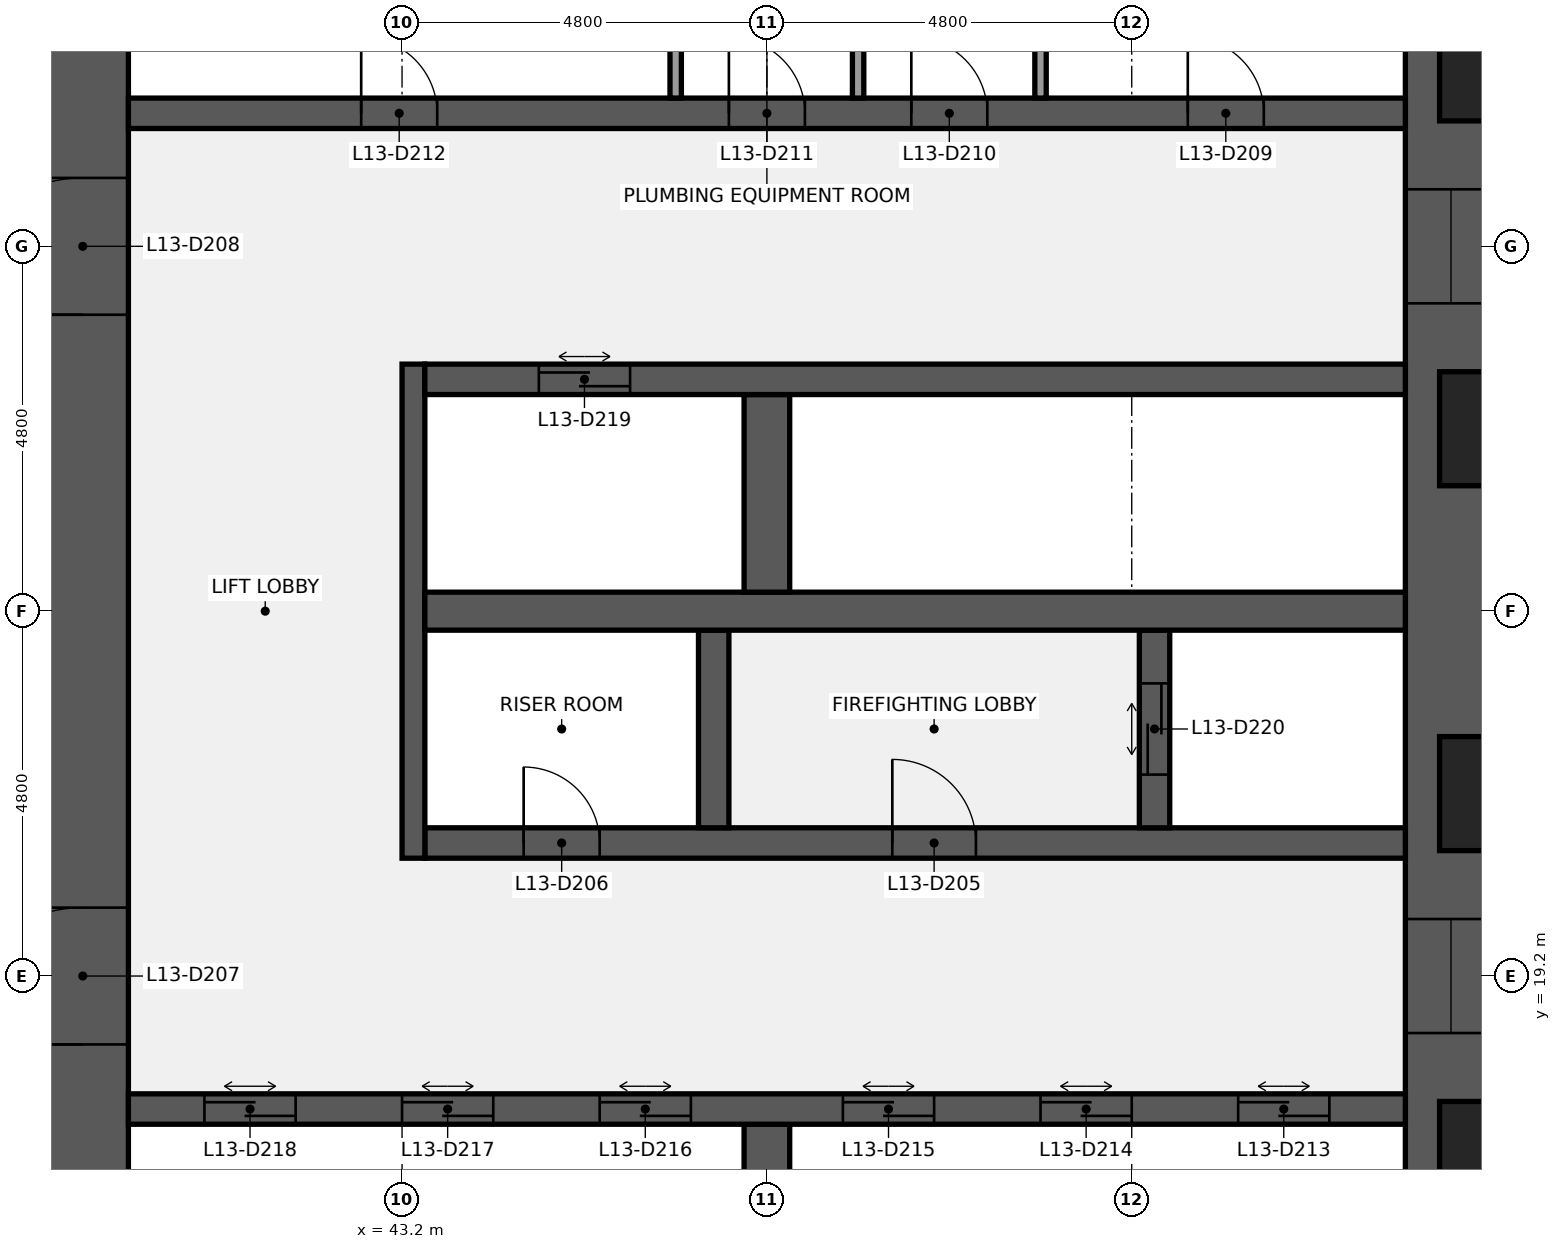
"""IFC4 building model, lengths in metres.
Left out: names, types, materials, properties, quantities, classifications, styles, units other than length and angle.
Written with IfcOpenShell. Run it as: python <this file> out.ifc"""

import sys

from ifc_helpers import new_model, si_unit, direction, frame, frame_2d, origin, place, context, subcontext, project, spatial, rectangle, extrude, element, fill, save


model = new_model("IFC4")
c1 = context("Model", 3, precision=1e-05, world=origin(), true_north=direction((0.0, 1.0)))
c2 = subcontext(c1, "Body", "Model", "MODEL_VIEW")
j1 = project(units=[si_unit("LENGTHUNIT", "METRE"), si_unit("PLANEANGLEUNIT", "RADIAN")], contexts=[c1])
p1 = place(None, origin())
s1 = spatial("IfcSite", under=j1, at=p1, CompositionType="ELEMENT")
p2 = place(p1, origin())
s2 = spatial("IfcBuilding", under=s1, at=p2, CompositionType="ELEMENT")
p3 = place(p2, frame((0.0, 0.0, 63.0)))
s3 = spatial("IfcBuildingStorey", under=s2, at=p3, CompositionType="ELEMENT", Elevation=63.0)
p4 = place(p3, frame((57.0, 38.4, 0.0), z_axis=(0.0, 0.0, 1.0), x_axis=(0.0, -1.0, 0.0)))
e1 = element("IfcWall", 1, at=p4, inside=s3, PredefinedType="SHEAR", context=c2, shape_type="SweptSolid", body=[
    extrude(rectangle(XDim=28.8, YDim=1.2, at=frame_2d((14.4, 0.0))), origin(), (0.0, 0.0, 1.0), 3.84),
])
p5 = place(p4, frame((18.45, 0.0, 0.9)))
e2 = element("IfcOpeningElement", 2, at=p5, cuts=e1, PredefinedType="OPENING", context=c2, shape_type="SweptSolid", body=[
    extrude(rectangle(XDim=1.5, YDim=1.5, at=frame_2d((0.75, 0.75))), frame((0.0, 0.61, 0.0), z_axis=(0.0, -1.0, 0.0), x_axis=(1.0, 0.0, 0.0)), (0.0, 0.0, 1.0), 1.22),
])
p6 = place(p4, frame((8.85, 0.0, 0.9)))
e3 = element("IfcOpeningElement", 3, at=p6, cuts=e1, PredefinedType="OPENING", context=c2, shape_type="SweptSolid", body=[
    extrude(rectangle(XDim=1.5, YDim=1.5, at=frame_2d((0.75, 0.75))), frame((0.0, 0.61, 0.0), z_axis=(0.0, -1.0, 0.0), x_axis=(1.0, 0.0, 0.0)), (0.0, 0.0, 1.0), 1.22),
])
p7 = place(p3, frame((39.0, 9.6, 0.0), z_axis=(0.0, 0.0, 1.0), x_axis=(0.0, 1.0, 0.0)))
e4 = element("IfcWall", 4, at=p7, inside=s3, PredefinedType="SHEAR", context=c2, shape_type="SweptSolid", body=[
    extrude(rectangle(XDim=28.8, YDim=1.2, at=frame_2d((14.4, 0.0))), origin(), (0.0, 0.0, 1.0), 3.84),
])
p8 = place(p7, frame((8.7, 0.0, 0.0)))
e5 = element("IfcOpeningElement", 5, at=p8, cuts=e4, PredefinedType="OPENING", context=c2, shape_type="SweptSolid", body=[
    extrude(rectangle(XDim=1.8, YDim=2.1, at=frame_2d((0.9, 1.05))), frame((0.0, 0.61, 0.0), z_axis=(0.0, -1.0, 0.0), x_axis=(1.0, 0.0, 0.0)), (0.0, 0.0, 1.0), 1.22),
])
p9 = place(p7, frame((18.3, 0.0, 0.0)))
e6 = element("IfcOpeningElement", 6, at=p9, cuts=e4, PredefinedType="OPENING", context=c2, shape_type="SweptSolid", body=[
    extrude(rectangle(XDim=1.8, YDim=2.1, at=frame_2d((0.9, 1.05))), frame((0.0, 0.61, 0.0), z_axis=(0.0, -1.0, 0.0), x_axis=(1.0, 0.0, 0.0)), (0.0, 0.0, 1.0), 1.22),
])
p10 = place(p3, frame((48.0, 14.65, 0.0), z_axis=(0.0, 0.0, 1.0), x_axis=(0.0, 1.0, 0.0)))
e7 = element("IfcWall", 7, at=p10, inside=s3, PredefinedType="SHEAR", context=c2, shape_type="SweptSolid", body=[
    extrude(rectangle(XDim=2.6, YDim=0.6, at=frame_2d((1.3, 0.0))), origin(), (0.0, 0.0, 1.0), 3.84),
])
p11 = place(p3, frame((39.6, 17.45, 0.0), z_axis=(0.0, 0.0, 1.0), x_axis=(1.0, 0.0, 0.0)))
e8 = element("IfcWall", 8, at=p11, inside=s3, PredefinedType="SHEAR", context=c2, shape_type="SweptSolid", body=[
    extrude(rectangle(XDim=16.8, YDim=0.4, at=frame_2d((8.4, 0.0))), origin(), (0.0, 0.0, 1.0), 3.84),
])
p12 = place(p11, frame((14.6, 0.0, 0.0)))
e9 = element("IfcOpeningElement", 9, at=p12, cuts=e8, PredefinedType="OPENING", context=c2, shape_type="SweptSolid", body=[
    extrude(rectangle(XDim=1.2, YDim=2.1, at=frame_2d((0.6, 1.05))), frame((0.0, 0.21, 0.0), z_axis=(0.0, -1.0, 0.0), x_axis=(1.0, 0.0, 0.0)), (0.0, 0.0, 1.0), 0.42),
])
p13 = place(p11, frame((12.0, 0.0, 0.0)))
e10 = element("IfcOpeningElement", 10, at=p13, cuts=e8, PredefinedType="OPENING", context=c2, shape_type="SweptSolid", body=[
    extrude(rectangle(XDim=1.2, YDim=2.1, at=frame_2d((0.6, 1.05))), frame((0.0, 0.21, 0.0), z_axis=(0.0, -1.0, 0.0), x_axis=(1.0, 0.0, 0.0)), (0.0, 0.0, 1.0), 0.42),
])
p14 = place(p11, frame((9.4, 0.0, 0.0)))
e11 = element("IfcOpeningElement", 11, at=p14, cuts=e8, PredefinedType="OPENING", context=c2, shape_type="SweptSolid", body=[
    extrude(rectangle(XDim=1.2, YDim=2.1, at=frame_2d((0.6, 1.05))), frame((0.0, 0.21, 0.0), z_axis=(0.0, -1.0, 0.0), x_axis=(1.0, 0.0, 0.0)), (0.0, 0.0, 1.0), 0.42),
])
p15 = place(p11, frame((6.2, 0.0, 0.0)))
e12 = element("IfcOpeningElement", 12, at=p15, cuts=e8, PredefinedType="OPENING", context=c2, shape_type="SweptSolid", body=[
    extrude(rectangle(XDim=1.2, YDim=2.1, at=frame_2d((0.6, 1.05))), frame((0.0, 0.21, 0.0), z_axis=(0.0, -1.0, 0.0), x_axis=(1.0, 0.0, 0.0)), (0.0, 0.0, 1.0), 0.42),
])
p16 = place(p11, frame((3.6, 0.0, 0.0)))
e13 = element("IfcOpeningElement", 13, at=p16, cuts=e8, PredefinedType="OPENING", context=c2, shape_type="SweptSolid", body=[
    extrude(rectangle(XDim=1.2, YDim=2.1, at=frame_2d((0.6, 1.05))), frame((0.0, 0.21, 0.0), z_axis=(0.0, -1.0, 0.0), x_axis=(1.0, 0.0, 0.0)), (0.0, 0.0, 1.0), 0.42),
])
p17 = place(p11, frame((1.0, 0.0, 0.0)))
e14 = element("IfcOpeningElement", 14, at=p17, cuts=e8, PredefinedType="OPENING", context=c2, shape_type="SweptSolid", body=[
    extrude(rectangle(XDim=1.2, YDim=2.1, at=frame_2d((0.6, 1.05))), frame((0.0, 0.21, 0.0), z_axis=(0.0, -1.0, 0.0), x_axis=(1.0, 0.0, 0.0)), (0.0, 0.0, 1.0), 0.42),
])
p18 = place(p3, frame((43.5, 20.95, 0.0), z_axis=(0.0, 0.0, 1.0), x_axis=(1.0, 0.0, 0.0)))
e15 = element("IfcWall", 15, at=p18, inside=s3, PredefinedType="SHEAR", context=c2, shape_type="SweptSolid", body=[
    extrude(rectangle(XDim=12.9, YDim=0.4, at=frame_2d((6.45, 0.0))), origin(), (0.0, 0.0, 1.0), 3.84),
])
p19 = place(p18, frame((6.15, 0.0, 0.0)))
e16 = element("IfcOpeningElement", 16, at=p19, cuts=e15, PredefinedType="OPENING", context=c2, shape_type="SweptSolid", body=[
    extrude(rectangle(XDim=1.1, YDim=2.1, at=frame_2d((0.55, 1.05))), frame((0.0, 0.21, 0.0), z_axis=(0.0, -1.0, 0.0), x_axis=(1.0, 0.0, 0.0)), (0.0, 0.0, 1.0), 0.42),
])
p20 = place(p18, frame((1.3, 0.0, 0.0)))
e17 = element("IfcOpeningElement", 17, at=p20, cuts=e15, PredefinedType="OPENING", context=c2, shape_type="SweptSolid", body=[
    extrude(rectangle(XDim=1.0, YDim=2.1, at=frame_2d((0.5, 1.05))), frame((0.0, 0.21, 0.0), z_axis=(0.0, -1.0, 0.0), x_axis=(1.0, 0.0, 0.0)), (0.0, 0.0, 1.0), 0.42),
])
p21 = place(p3, frame((43.35, 20.75, 0.0), z_axis=(0.0, 0.0, 1.0), x_axis=(0.0, 1.0, 0.0)))
e18 = element("IfcWall", 18, at=p21, inside=s3, PredefinedType="SHEAR", context=c2, shape_type="SweptSolid", body=[
    extrude(rectangle(XDim=6.5, YDim=0.3, at=frame_2d((3.25, 0.0))), origin(), (0.0, 0.0, 1.0), 3.84),
])
p22 = place(p3, frame((53.1, 21.15, 0.0), z_axis=(0.0, 0.0, 1.0), x_axis=(0.0, 1.0, 0.0)))
e19 = element("IfcWall", 19, at=p22, inside=s3, PredefinedType="SHEAR", context=c2, shape_type="SweptSolid", body=[
    extrude(rectangle(XDim=2.6, YDim=0.4, at=frame_2d((1.3, 0.0))), origin(), (0.0, 0.0, 1.0), 3.84),
])
p23 = place(p22, frame((0.7, 0.0, 0.0)))
e20 = element("IfcOpeningElement", 20, at=p23, cuts=e19, PredefinedType="OPENING", context=c2, shape_type="SweptSolid", body=[
    extrude(rectangle(XDim=1.2, YDim=2.1, at=frame_2d((0.6, 1.05))), frame((0.0, 0.21, 0.0), z_axis=(0.0, -1.0, 0.0), x_axis=(1.0, 0.0, 0.0)), (0.0, 0.0, 1.0), 0.42),
])
p24 = place(p3, frame((47.3, 21.15, 0.0), z_axis=(0.0, 0.0, 1.0), x_axis=(0.0, 1.0, 0.0)))
e21 = element("IfcWall", 21, at=p24, inside=s3, PredefinedType="SHEAR", context=c2, shape_type="SweptSolid", body=[
    extrude(rectangle(XDim=2.6, YDim=0.4, at=frame_2d((1.3, 0.0))), origin(), (0.0, 0.0, 1.0), 3.84),
])
p25 = place(p3, frame((43.5, 24.0, 0.0), z_axis=(0.0, 0.0, 1.0), x_axis=(1.0, 0.0, 0.0)))
e22 = element("IfcWall", 22, at=p25, inside=s3, PredefinedType="SHEAR", context=c2, shape_type="SweptSolid", body=[
    extrude(rectangle(XDim=12.9, YDim=0.5, at=frame_2d((6.45, 0.0))), origin(), (0.0, 0.0, 1.0), 3.84),
])
p26 = place(p3, frame((48.0, 24.25, 0.0), z_axis=(0.0, 0.0, 1.0), x_axis=(0.0, 1.0, 0.0)))
e23 = element("IfcWall", 23, at=p26, inside=s3, PredefinedType="SHEAR", context=c2, shape_type="SweptSolid", body=[
    extrude(rectangle(XDim=2.6, YDim=0.6, at=frame_2d((1.3, 0.0))), origin(), (0.0, 0.0, 1.0), 3.84),
])
p27 = place(p3, frame((43.5, 27.05, 0.0), z_axis=(0.0, 0.0, 1.0), x_axis=(1.0, 0.0, 0.0)))
e24 = element("IfcWall", 24, at=p27, inside=s3, PredefinedType="SHEAR", context=c2, shape_type="SweptSolid", body=[
    extrude(rectangle(XDim=12.9, YDim=0.4, at=frame_2d((6.45, 0.0))), origin(), (0.0, 0.0, 1.0), 3.84),
])
p28 = place(p27, frame((1.5, 0.0, 0.0)))
e25 = element("IfcOpeningElement", 25, at=p28, cuts=e24, PredefinedType="OPENING", context=c2, shape_type="SweptSolid", body=[
    extrude(rectangle(XDim=1.2, YDim=2.1, at=frame_2d((0.6, 1.05))), frame((0.0, 0.21, 0.0), z_axis=(0.0, -1.0, 0.0), x_axis=(1.0, 0.0, 0.0)), (0.0, 0.0, 1.0), 0.42),
])
p29 = place(p3, frame((39.6, 30.55, 0.0), z_axis=(0.0, 0.0, 1.0), x_axis=(1.0, 0.0, 0.0)))
e26 = element("IfcWall", 26, at=p29, inside=s3, PredefinedType="SHEAR", context=c2, shape_type="SweptSolid", body=[
    extrude(rectangle(XDim=16.8, YDim=0.4, at=frame_2d((8.4, 0.0))), origin(), (0.0, 0.0, 1.0), 3.84),
])
p30 = place(p29, frame((13.938, 0.0, 0.0)))
e27 = element("IfcOpeningElement", 27, at=p30, cuts=e26, PredefinedType="OPENING", context=c2, shape_type="SweptSolid", body=[
    extrude(rectangle(XDim=1.0, YDim=2.1, at=frame_2d((0.5, 1.05))), frame((0.0, 0.21, 0.0), z_axis=(0.0, -1.0, 0.0), x_axis=(1.0, 0.0, 0.0)), (0.0, 0.0, 1.0), 0.42),
])
p31 = place(p29, frame((10.3, 0.0, 0.0)))
e28 = element("IfcOpeningElement", 28, at=p31, cuts=e26, PredefinedType="OPENING", context=c2, shape_type="SweptSolid", body=[
    extrude(rectangle(XDim=1.0, YDim=2.1, at=frame_2d((0.5, 1.05))), frame((0.0, 0.21, 0.0), z_axis=(0.0, -1.0, 0.0), x_axis=(1.0, 0.0, 0.0)), (0.0, 0.0, 1.0), 0.42),
])
p32 = place(p29, frame((7.9, 0.0, 0.0)))
e29 = element("IfcOpeningElement", 29, at=p32, cuts=e26, PredefinedType="OPENING", context=c2, shape_type="SweptSolid", body=[
    extrude(rectangle(XDim=1.0, YDim=2.1, at=frame_2d((0.5, 1.05))), frame((0.0, 0.21, 0.0), z_axis=(0.0, -1.0, 0.0), x_axis=(1.0, 0.0, 0.0)), (0.0, 0.0, 1.0), 0.42),
])
p33 = place(p29, frame((3.062, 0.0, 0.0)))
e30 = element("IfcOpeningElement", 30, at=p33, cuts=e26, PredefinedType="OPENING", context=c2, shape_type="SweptSolid", body=[
    extrude(rectangle(XDim=1.0, YDim=2.1, at=frame_2d((0.5, 1.05))), frame((0.0, 0.21, 0.0), z_axis=(0.0, -1.0, 0.0), x_axis=(1.0, 0.0, 0.0)), (0.0, 0.0, 1.0), 0.42),
])
for number, where, z_axis, x_axis in (
    (31, (51.6, 30.75, 0.0), (0.0, 0.0, 1.0), (0.0, 1.0, 0.0)),
    (32, (49.2, 30.75, 0.0), (0.0, 0.0, 1.0), (0.0, 1.0, 0.0)),
    (33, (46.8, 30.75, 0.0), (0.0, 0.0, 1.0), (0.0, 1.0, 0.0)),
):
    element("IfcWall", number, at=place(p3, frame(where, z_axis=z_axis, x_axis=x_axis)), inside=s3, PredefinedType="PARTITIONING", context=c2, shape_type="SweptSolid", body=[
        extrude(rectangle(XDim=2.6, YDim=0.15, at=frame_2d((1.3, 0.0))), origin(), (0.0, 0.0, 1.0), 3.84),
    ])
p34 = place(p19, origin())
e34 = element("IfcDoor", 34, at=p34, inside=s3, OperationType="SINGLE_SWING_LEFT", PredefinedType="DOOR", context=c2, shape_type="SweptSolid", body=[
    extrude(rectangle(XDim=1.1, YDim=2.1, at=frame_2d((0.55, 1.05))), frame((0.0, 0.025, 0.0), z_axis=(0.0, -1.0, 0.0), x_axis=(1.0, 0.0, 0.0)), (0.0, 0.0, 1.0), 0.05),
])
fill(e16, e34)
p35 = place(p20, origin())
e35 = element("IfcDoor", 35, at=p35, inside=s3, OperationType="SINGLE_SWING_LEFT", PredefinedType="DOOR", context=c2, shape_type="SweptSolid", body=[
    extrude(rectangle(XDim=1.0, YDim=2.1, at=frame_2d((0.5, 1.05))), frame((0.0, 0.025, 0.0), z_axis=(0.0, -1.0, 0.0), x_axis=(1.0, 0.0, 0.0)), (0.0, 0.0, 1.0), 0.05),
])
fill(e17, e35)
p36 = place(p8, origin())
e36 = element("IfcDoor", 36, at=p36, inside=s3, OperationType="DOUBLE_DOOR_SINGLE_SWING", PredefinedType="DOOR", context=c2, shape_type="SweptSolid", body=[
    extrude(rectangle(XDim=1.8, YDim=2.1, at=frame_2d((0.9, 1.05))), frame((0.0, 0.025, 0.0), z_axis=(0.0, -1.0, 0.0), x_axis=(1.0, 0.0, 0.0)), (0.0, 0.0, 1.0), 0.05),
])
fill(e5, e36)
p37 = place(p9, origin())
e37 = element("IfcDoor", 37, at=p37, inside=s3, OperationType="DOUBLE_DOOR_SINGLE_SWING", PredefinedType="DOOR", context=c2, shape_type="SweptSolid", body=[
    extrude(rectangle(XDim=1.8, YDim=2.1, at=frame_2d((0.9, 1.05))), frame((0.0, 0.025, 0.0), z_axis=(0.0, -1.0, 0.0), x_axis=(1.0, 0.0, 0.0)), (0.0, 0.0, 1.0), 0.05),
])
fill(e6, e37)
p38 = place(p30, origin())
e38 = element("IfcDoor", 38, at=p38, inside=s3, OperationType="SINGLE_SWING_LEFT", PredefinedType="DOOR", context=c2, shape_type="SweptSolid", body=[
    extrude(rectangle(XDim=1.0, YDim=2.1, at=frame_2d((0.5, 1.05))), frame((0.0, 0.025, 0.0), z_axis=(0.0, -1.0, 0.0), x_axis=(1.0, 0.0, 0.0)), (0.0, 0.0, 1.0), 0.05),
])
fill(e27, e38)
p39 = place(p31, origin())
e39 = element("IfcDoor", 39, at=p39, inside=s3, OperationType="SINGLE_SWING_LEFT", PredefinedType="DOOR", context=c2, shape_type="SweptSolid", body=[
    extrude(rectangle(XDim=1.0, YDim=2.1, at=frame_2d((0.5, 1.05))), frame((0.0, 0.025, 0.0), z_axis=(0.0, -1.0, 0.0), x_axis=(1.0, 0.0, 0.0)), (0.0, 0.0, 1.0), 0.05),
])
fill(e28, e39)
p40 = place(p32, origin())
e40 = element("IfcDoor", 40, at=p40, inside=s3, OperationType="SINGLE_SWING_LEFT", PredefinedType="DOOR", context=c2, shape_type="SweptSolid", body=[
    extrude(rectangle(XDim=1.0, YDim=2.1, at=frame_2d((0.5, 1.05))), frame((0.0, 0.025, 0.0), z_axis=(0.0, -1.0, 0.0), x_axis=(1.0, 0.0, 0.0)), (0.0, 0.0, 1.0), 0.05),
])
fill(e29, e40)
p41 = place(p33, origin())
e41 = element("IfcDoor", 41, at=p41, inside=s3, OperationType="SINGLE_SWING_LEFT", PredefinedType="DOOR", context=c2, shape_type="SweptSolid", body=[
    extrude(rectangle(XDim=1.0, YDim=2.1, at=frame_2d((0.5, 1.05))), frame((0.0, 0.025, 0.0), z_axis=(0.0, -1.0, 0.0), x_axis=(1.0, 0.0, 0.0)), (0.0, 0.0, 1.0), 0.05),
])
fill(e30, e41)
p42 = place(p12, origin())
e42 = element("IfcDoor", 42, at=p42, inside=s3, OperationType="DOUBLE_DOOR_SLIDING", PredefinedType="DOOR", context=c2, shape_type="SweptSolid", body=[
    extrude(rectangle(XDim=1.2, YDim=2.1, at=frame_2d((0.6, 1.05))), frame((0.0, 0.025, 0.0), z_axis=(0.0, -1.0, 0.0), x_axis=(1.0, 0.0, 0.0)), (0.0, 0.0, 1.0), 0.05),
])
fill(e9, e42)
p43 = place(p13, origin())
e43 = element("IfcDoor", 43, at=p43, inside=s3, OperationType="DOUBLE_DOOR_SLIDING", PredefinedType="DOOR", context=c2, shape_type="SweptSolid", body=[
    extrude(rectangle(XDim=1.2, YDim=2.1, at=frame_2d((0.6, 1.05))), frame((0.0, 0.025, 0.0), z_axis=(0.0, -1.0, 0.0), x_axis=(1.0, 0.0, 0.0)), (0.0, 0.0, 1.0), 0.05),
])
fill(e10, e43)
p44 = place(p14, origin())
e44 = element("IfcDoor", 44, at=p44, inside=s3, OperationType="DOUBLE_DOOR_SLIDING", PredefinedType="DOOR", context=c2, shape_type="SweptSolid", body=[
    extrude(rectangle(XDim=1.2, YDim=2.1, at=frame_2d((0.6, 1.05))), frame((0.0, 0.025, 0.0), z_axis=(0.0, -1.0, 0.0), x_axis=(1.0, 0.0, 0.0)), (0.0, 0.0, 1.0), 0.05),
])
fill(e11, e44)
p45 = place(p15, origin())
e45 = element("IfcDoor", 45, at=p45, inside=s3, OperationType="DOUBLE_DOOR_SLIDING", PredefinedType="DOOR", context=c2, shape_type="SweptSolid", body=[
    extrude(rectangle(XDim=1.2, YDim=2.1, at=frame_2d((0.6, 1.05))), frame((0.0, 0.025, 0.0), z_axis=(0.0, -1.0, 0.0), x_axis=(1.0, 0.0, 0.0)), (0.0, 0.0, 1.0), 0.05),
])
fill(e12, e45)
p46 = place(p16, origin())
e46 = element("IfcDoor", 46, at=p46, inside=s3, OperationType="DOUBLE_DOOR_SLIDING", PredefinedType="DOOR", context=c2, shape_type="SweptSolid", body=[
    extrude(rectangle(XDim=1.2, YDim=2.1, at=frame_2d((0.6, 1.05))), frame((0.0, 0.025, 0.0), z_axis=(0.0, -1.0, 0.0), x_axis=(1.0, 0.0, 0.0)), (0.0, 0.0, 1.0), 0.05),
])
fill(e13, e46)
p47 = place(p17, origin())
e47 = element("IfcDoor", 47, at=p47, inside=s3, OperationType="DOUBLE_DOOR_SLIDING", PredefinedType="DOOR", context=c2, shape_type="SweptSolid", body=[
    extrude(rectangle(XDim=1.2, YDim=2.1, at=frame_2d((0.6, 1.05))), frame((0.0, 0.025, 0.0), z_axis=(0.0, -1.0, 0.0), x_axis=(1.0, 0.0, 0.0)), (0.0, 0.0, 1.0), 0.05),
])
fill(e14, e47)
p48 = place(p28, origin())
e48 = element("IfcDoor", 48, at=p48, inside=s3, OperationType="DOUBLE_DOOR_SLIDING", PredefinedType="DOOR", context=c2, shape_type="SweptSolid", body=[
    extrude(rectangle(XDim=1.2, YDim=2.1, at=frame_2d((0.6, 1.05))), frame((0.0, 0.025, 0.0), z_axis=(0.0, -1.0, 0.0), x_axis=(1.0, 0.0, 0.0)), (0.0, 0.0, 1.0), 0.05),
])
fill(e25, e48)
p49 = place(p23, origin())
e49 = element("IfcDoor", 49, at=p49, inside=s3, OperationType="DOUBLE_DOOR_SLIDING", PredefinedType="DOOR", context=c2, shape_type="SweptSolid", body=[
    extrude(rectangle(XDim=1.2, YDim=2.1, at=frame_2d((0.6, 1.05))), frame((0.0, 0.025, 0.0), z_axis=(0.0, -1.0, 0.0), x_axis=(1.0, 0.0, 0.0)), (0.0, 0.0, 1.0), 0.05),
])
fill(e20, e49)
p50 = place(p5, origin())
e50 = element("IfcWindow", 50, at=p50, inside=s3, PartitioningType="SINGLE_PANEL", PredefinedType="WINDOW", context=c2, shape_type="SweptSolid", body=[
    extrude(rectangle(XDim=1.5, YDim=1.5, at=frame_2d((0.75, 0.75))), frame((0.0, 0.03, 0.0), z_axis=(0.0, -1.0, 0.0), x_axis=(1.0, 0.0, 0.0)), (0.0, 0.0, 1.0), 0.06),
])
fill(e2, e50)
p51 = place(p6, origin())
e51 = element("IfcWindow", 51, at=p51, inside=s3, PartitioningType="SINGLE_PANEL", PredefinedType="WINDOW", context=c2, shape_type="SweptSolid", body=[
    extrude(rectangle(XDim=1.5, YDim=1.5, at=frame_2d((0.75, 0.75))), frame((0.0, 0.03, 0.0), z_axis=(0.0, -1.0, 0.0), x_axis=(1.0, 0.0, 0.0)), (0.0, 0.0, 1.0), 0.06),
])
fill(e3, e51)
save(model, sys.argv[1])
